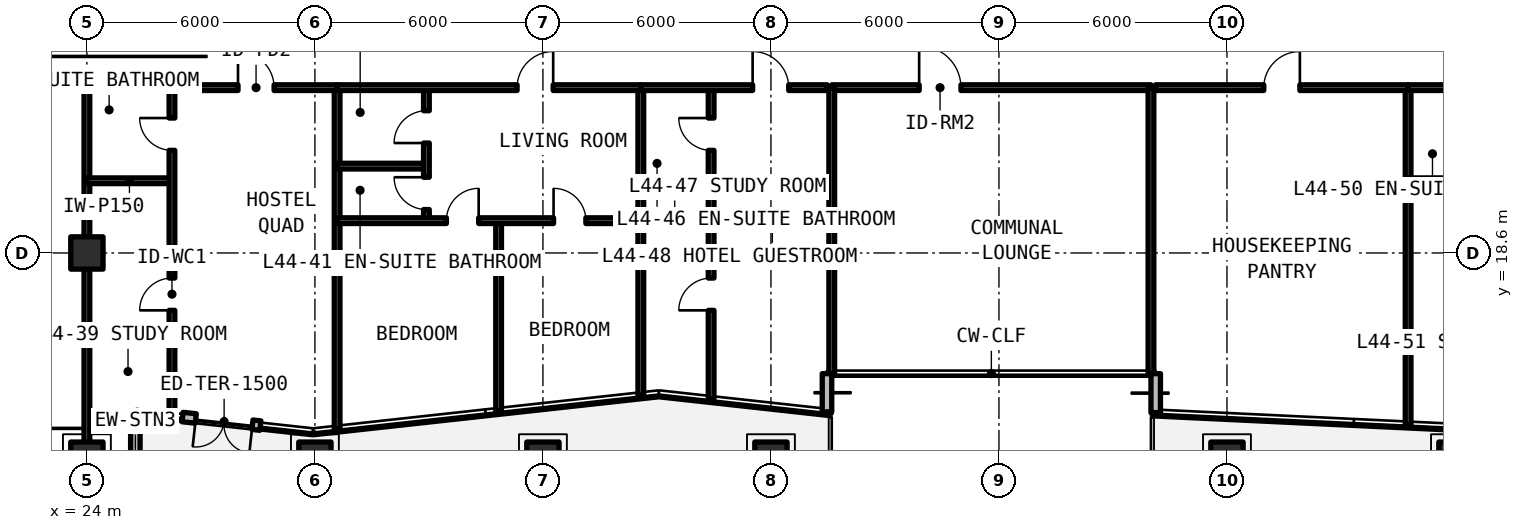
"""IFC4 building model, lengths in metres.
Left out: names, types, materials, properties, quantities, classifications, styles, units other than length and angle.
Written with IfcOpenShell. Run it as: python <this file> out.ifc"""

import sys

from ifc_helpers import new_model, si_unit, direction, frame, frame_2d, origin, origin_2d, place, context, subcontext, project, spatial, rectangle, extrude, element, fill, save


model = new_model("IFC4")
c1 = context("Model", 3, precision=1e-05, world=origin(), true_north=direction((0.0, 1.0)))
c2 = subcontext(c1, "Body", "Model", "MODEL_VIEW")
j1 = project(units=[si_unit("LENGTHUNIT", "METRE"), si_unit("PLANEANGLEUNIT", "RADIAN")], contexts=[c1])
p1 = place(None, origin())
s1 = spatial("IfcSite", under=j1, at=p1, CompositionType="ELEMENT")
p2 = place(p1, origin())
s2 = spatial("IfcBuilding", under=s1, at=p2, CompositionType="ELEMENT")
p3 = place(p2, frame((0.0, 0.0, 158.4)))
s3 = spatial("IfcBuildingStorey", under=s2, at=p3, CompositionType="ELEMENT", Elevation=158.4)
for number, where, z_axis, x_axis in (
    (1, (24.0, 18.6, 0.0), (0.0, 0.0, 1.0), (1.0, 0.0, 0.0)),
    (2, (24.0, 13.2, 0.0), (0.0, 0.0, 1.0), (1.0, 0.0, 0.0)),
    (3, (30.0, 13.2, 0.0), (0.0, 0.0, 1.0), (1.0, 0.0, 0.0)),
    (4, (36.0, 13.2, 0.0), (0.0, 0.0, 1.0), (1.0, 0.0, 0.0)),
    (5, (42.0, 13.2, 0.0), (0.0, 0.0, 1.0), (1.0, 0.0, 0.0)),
    (6, (54.0, 13.2, 0.0), (0.0, 0.0, 1.0), (1.0, 0.0, 0.0)),
    (7, (60.0, 13.2, 0.0), (0.0, 0.0, 1.0), (1.0, 0.0, 0.0)),
):
    element("IfcColumn", number, at=place(p3, frame(where, z_axis=z_axis, x_axis=x_axis)), inside=s3, PredefinedType="COLUMN", context=c2, shape_type="SweptSolid", body=[
        extrude(rectangle(XDim=0.85, YDim=0.85, at=origin_2d()), origin(), (0.0, 0.0, 1.0), 3.63),
    ])
p4 = place(p3, frame((25.275, 12.025, 0.0), z_axis=(0.0, 0.0, 1.0), x_axis=(0.0, 1.0, 0.0)))
e8 = element("IfcWall", 8, at=p4, inside=s3, PredefinedType="SOLIDWALL", context=c2, shape_type="SweptSolid", body=[
    extrude(rectangle(XDim=2.395, YDim=0.25, at=frame_2d((1.197, 0.0))), origin(), (0.0, 0.0, 1.0), 3.41),
])
p5 = place(p3, frame((26.518, 14.283, 0.0), z_axis=(0.0, 0.0, 1.0), x_axis=(0.994024562576, -0.109156625985, 0.0)))
e9 = element("IfcWall", 9, at=p5, inside=s3, PredefinedType="SOLIDWALL", context=c2, shape_type="SweptSolid", body=[
    extrude(rectangle(XDim=2.06, YDim=0.25, at=frame_2d((1.03, 0.0))), origin(), (0.0, 0.0, 1.0), 3.41),
])
p6 = place(p5, frame((0.35, 0.0, 0.0)))
e10 = element("IfcOpeningElement", 10, at=p6, cuts=e9, PredefinedType="OPENING", context=c2, shape_type="SweptSolid", body=[
    extrude(rectangle(XDim=1.5, YDim=2.2, at=frame_2d((0.75, 1.1))), frame((0.0, 0.135, 0.0), z_axis=(0.0, -1.0, 0.0), x_axis=(1.0, 0.0, 0.0)), (0.0, 0.0, 1.0), 0.27),
])
p7 = place(p3, frame((43.475, 14.419, 0.0), z_axis=(0.0, 0.0, 1.0), x_axis=(0.0, 1.0, 0.0)))
e11 = element("IfcWall", 11, at=p7, inside=s3, PredefinedType="SOLIDWALL", context=c2, shape_type="SweptSolid", body=[
    extrude(rectangle(XDim=1.006, YDim=0.25, at=frame_2d((0.503, 0.0))), origin(), (0.0, 0.0, 1.0), 3.41),
])
p8 = place(p3, frame((52.125, 15.425, 0.0), z_axis=(0.0, 0.0, 1.0), x_axis=(0.0, -1.0, 0.0)))
e12 = element("IfcWall", 12, at=p8, inside=s3, PredefinedType="SOLIDWALL", context=c2, shape_type="SweptSolid", body=[
    extrude(rectangle(XDim=1.026, YDim=0.25, at=frame_2d((0.513, 0.0))), origin(), (0.0, 0.0, 1.0), 3.41),
])
p9 = place(p3, frame((19.725, 16.152, 0.0), z_axis=(0.0, 0.0, 1.0), x_axis=(0.70708586489, -0.707127696864, 0.0)))
e13 = element("IfcWall", 13, at=p9, inside=s3, PredefinedType="SOLIDWALL", context=c2, shape_type="SweptSolid", body=[
    extrude(rectangle(XDim=5.836, YDim=0.25, at=frame_2d((2.918, 0.0))), origin(), (0.0, 0.0, 1.0), 3.41),
])
p10 = place(p9, frame((0.898, 0.0, 0.78)))
e14 = element("IfcOpeningElement", 14, at=p10, cuts=e13, PredefinedType="OPENING", context=c2, shape_type="SweptSolid", body=[
    extrude(rectangle(XDim=3.4, YDim=1.66, at=frame_2d((1.7, 0.83))), frame((0.0, 0.135, 0.0), z_axis=(0.0, -1.0, 0.0), x_axis=(1.0, 0.0, 0.0)), (0.0, 0.0, 1.0), 0.27),
])
p11 = place(p3, frame((43.6, 22.95, 0.0), z_axis=(0.0, 0.0, 1.0), x_axis=(1.0, 0.0, 0.0)))
e15 = element("IfcWall", 15, at=p11, inside=s3, PredefinedType="SOLIDWALL", context=c2, shape_type="SweptSolid", body=[
    extrude(rectangle(XDim=8.4, YDim=0.15, at=frame_2d((4.2, 0.0))), origin(), (0.0, 0.0, 1.0), 2.63),
])
p12 = place(p11, frame((2.3, 0.0, 0.0)))
e16 = element("IfcOpeningElement", 16, at=p12, cuts=e15, PredefinedType="OPENING", context=c2, shape_type="SweptSolid", body=[
    extrude(rectangle(XDim=1.1, YDim=2.15, at=frame_2d((0.55, 1.075))), frame((0.0, 0.085, 0.0), z_axis=(0.0, -1.0, 0.0), x_axis=(1.0, 0.0, 0.0)), (0.0, 0.0, 1.0), 0.17),
])
for number, where, z_axis, x_axis in (
    (17, (43.6, 15.425, 0.0), (0.0, 0.0, 1.0), (0.0, 1.0, 0.0)),
    (18, (52.0, 15.425, 0.0), (0.0, 0.0, 1.0), (0.0, 1.0, 0.0)),
):
    element("IfcWall", number, at=place(p3, frame(where, z_axis=z_axis, x_axis=x_axis)), inside=s3, PredefinedType="SOLIDWALL", context=c2, shape_type="SweptSolid", body=[
        extrude(rectangle(XDim=7.525, YDim=0.15, at=frame_2d((3.762, 0.0))), origin(), (0.0, 0.0, 1.0), 2.63),
    ])
p13 = place(p3, frame((24.0, 12.025, 0.0), z_axis=(0.0, 0.0, 1.0), x_axis=(0.0, 1.0, 0.0)))
e19 = element("IfcWall", 19, at=p13, inside=s3, PredefinedType="SOLIDWALL", context=c2, shape_type="SweptSolid", body=[
    extrude(rectangle(XDim=10.925, YDim=0.15, at=frame_2d((5.462, 0.0))), origin(), (0.0, 0.0, 1.0), 2.63),
])
p14 = place(p3, frame((30.584, 13.976, 0.0), z_axis=(0.0, 0.0, 1.0), x_axis=(0.0, 1.0, 0.0)))
e20 = element("IfcWall", 20, at=p14, inside=s3, PredefinedType="SOLIDWALL", context=c2, shape_type="SweptSolid", body=[
    extrude(rectangle(XDim=8.974, YDim=0.15, at=frame_2d((4.487, 0.0))), origin(), (0.0, 0.0, 1.0), 2.63),
])
p15 = place(p3, frame((24.0, 20.5, 0.0), z_axis=(0.0, 0.0, 1.0), x_axis=(1.0, 0.0, 0.0)))
e21 = element("IfcWall", 21, at=p15, inside=s3, PredefinedType="PARTITIONING", context=c2, shape_type="SweptSolid", body=[
    extrude(rectangle(XDim=2.239, YDim=0.15, at=frame_2d((1.119, 0.0))), origin(), (0.0, 0.0, 1.0), 2.63),
])
p16 = place(p3, frame((26.239, 14.314, 0.0), z_axis=(0.0, 0.0, 1.0), x_axis=(0.0, 1.0, 0.0)))
e22 = element("IfcWall", 22, at=p16, inside=s3, PredefinedType="PARTITIONING", context=c2, shape_type="SweptSolid", body=[
    extrude(rectangle(XDim=8.636, YDim=0.15, at=frame_2d((4.318, 0.0))), origin(), (0.0, 0.0, 1.0), 2.63),
])
p17 = place(p16, frame((2.776, 0.0, 0.0)))
e23 = element("IfcOpeningElement", 23, at=p17, cuts=e22, PredefinedType="OPENING", context=c2, shape_type="SweptSolid", body=[
    extrude(rectangle(XDim=0.85, YDim=2.1, at=frame_2d((0.425, 1.05))), frame((0.0, 0.085, 0.0), z_axis=(0.0, -1.0, 0.0), x_axis=(1.0, 0.0, 0.0)), (0.0, 0.0, 1.0), 0.17),
])
p18 = place(p16, frame((6.986, 0.0, 0.0)))
e24 = element("IfcOpeningElement", 24, at=p18, cuts=e22, PredefinedType="OPENING", context=c2, shape_type="SweptSolid", body=[
    extrude(rectangle(XDim=0.85, YDim=2.1, at=frame_2d((0.425, 1.05))), frame((0.0, 0.085, 0.0), z_axis=(0.0, -1.0, 0.0), x_axis=(1.0, 0.0, 0.0)), (0.0, 0.0, 1.0), 0.17),
])
p19 = place(p3, frame((24.0, 22.95, 0.0), z_axis=(0.0, 0.0, 1.0), x_axis=(1.0, 0.0, 0.0)))
e25 = element("IfcWall", 25, at=p19, inside=s3, PredefinedType="SOLIDWALL", context=c2, shape_type="SweptSolid", body=[
    extrude(rectangle(XDim=6.584, YDim=0.15, at=frame_2d((3.292, 0.0))), origin(), (0.0, 0.0, 1.0), 2.63),
])
p20 = place(p19, frame((3.976, 0.0, 0.0)))
e26 = element("IfcOpeningElement", 26, at=p20, cuts=e25, PredefinedType="OPENING", context=c2, shape_type="SweptSolid", body=[
    extrude(rectangle(XDim=0.95, YDim=2.15, at=frame_2d((0.475, 1.075))), frame((0.0, 0.085, 0.0), z_axis=(0.0, -1.0, 0.0), x_axis=(1.0, 0.0, 0.0)), (0.0, 0.0, 1.0), 0.17),
])
p21 = place(p3, frame((38.576, 14.854, 0.0), z_axis=(0.0, 0.0, 1.0), x_axis=(0.0, 1.0, 0.0)))
e27 = element("IfcWall", 27, at=p21, inside=s3, PredefinedType="SOLIDWALL", context=c2, shape_type="SweptSolid", body=[
    extrude(rectangle(XDim=8.096, YDim=0.15, at=frame_2d((4.048, 0.0))), origin(), (0.0, 0.0, 1.0), 2.63),
])
p22 = place(p3, frame((30.584, 20.885, 0.0), z_axis=(0.0, 0.0, 1.0), x_axis=(1.0, 0.0, 0.0)))
e28 = element("IfcWall", 28, at=p22, inside=s3, PredefinedType="PARTITIONING", context=c2, shape_type="SweptSolid", body=[
    extrude(rectangle(XDim=2.35, YDim=0.15, at=frame_2d((1.175, 0.0))), origin(), (0.0, 0.0, 1.0), 2.63),
])
p23 = place(p3, frame((32.934, 19.45, 0.0), z_axis=(0.0, 0.0, 1.0), x_axis=(0.0, 1.0, 0.0)))
e29 = element("IfcWall", 29, at=p23, inside=s3, PredefinedType="PARTITIONING", context=c2, shape_type="SweptSolid", body=[
    extrude(rectangle(XDim=3.5, YDim=0.15, at=frame_2d((1.75, 0.0))), origin(), (0.0, 0.0, 1.0), 2.63),
])
p24 = place(p23, frame((0.292, 0.0, 0.0)))
e30 = element("IfcOpeningElement", 30, at=p24, cuts=e29, PredefinedType="OPENING", context=c2, shape_type="SweptSolid", body=[
    extrude(rectangle(XDim=0.85, YDim=2.1, at=frame_2d((0.425, 1.05))), frame((0.0, 0.085, 0.0), z_axis=(0.0, -1.0, 0.0), x_axis=(1.0, 0.0, 0.0)), (0.0, 0.0, 1.0), 0.17),
])
p25 = place(p23, frame((2.042, 0.0, 0.0)))
e31 = element("IfcOpeningElement", 31, at=p25, cuts=e29, PredefinedType="OPENING", context=c2, shape_type="SweptSolid", body=[
    extrude(rectangle(XDim=0.85, YDim=2.1, at=frame_2d((0.425, 1.05))), frame((0.0, 0.085, 0.0), z_axis=(0.0, -1.0, 0.0), x_axis=(1.0, 0.0, 0.0)), (0.0, 0.0, 1.0), 0.17),
])
p26 = place(p3, frame((34.834, 14.442, 0.0), z_axis=(0.0, 0.0, 1.0), x_axis=(0.0, 1.0, 0.0)))
e32 = element("IfcWall", 32, at=p26, inside=s3, PredefinedType="PARTITIONING", context=c2, shape_type="SweptSolid", body=[
    extrude(rectangle(XDim=5.008, YDim=0.15, at=frame_2d((2.504, 0.0))), origin(), (0.0, 0.0, 1.0), 2.63),
])
p27 = place(p3, frame((30.584, 19.45, 0.0), z_axis=(0.0, 0.0, 1.0), x_axis=(1.0, 0.0, 0.0)))
e33 = element("IfcWall", 33, at=p27, inside=s3, PredefinedType="PARTITIONING", context=c2, shape_type="SweptSolid", body=[
    extrude(rectangle(XDim=7.992, YDim=0.15, at=frame_2d((3.996, 0.0))), origin(), (0.0, 0.0, 1.0), 2.63),
])
p28 = place(p27, frame((2.875, 0.0, 0.0)))
e34 = element("IfcOpeningElement", 34, at=p28, cuts=e33, PredefinedType="OPENING", context=c2, shape_type="SweptSolid", body=[
    extrude(rectangle(XDim=0.85, YDim=2.1, at=frame_2d((0.425, 1.05))), frame((0.0, 0.085, 0.0), z_axis=(0.0, -1.0, 0.0), x_axis=(1.0, 0.0, 0.0)), (0.0, 0.0, 1.0), 0.17),
])
p29 = place(p27, frame((5.696, 0.0, 0.0)))
e35 = element("IfcOpeningElement", 35, at=p29, cuts=e33, PredefinedType="OPENING", context=c2, shape_type="SweptSolid", body=[
    extrude(rectangle(XDim=0.85, YDim=2.1, at=frame_2d((0.425, 1.05))), frame((0.0, 0.085, 0.0), z_axis=(0.0, -1.0, 0.0), x_axis=(1.0, 0.0, 0.0)), (0.0, 0.0, 1.0), 0.17),
])
p30 = place(p3, frame((30.584, 22.95, 0.0), z_axis=(0.0, 0.0, 1.0), x_axis=(1.0, 0.0, 0.0)))
e36 = element("IfcWall", 36, at=p30, inside=s3, PredefinedType="SOLIDWALL", context=c2, shape_type="SweptSolid", body=[
    extrude(rectangle(XDim=7.992, YDim=0.15, at=frame_2d((3.996, 0.0))), origin(), (0.0, 0.0, 1.0), 2.63),
])
p31 = place(p30, frame((4.736, 0.0, 0.0)))
e37 = element("IfcOpeningElement", 37, at=p31, cuts=e36, PredefinedType="OPENING", context=c2, shape_type="SweptSolid", body=[
    extrude(rectangle(XDim=0.95, YDim=2.15, at=frame_2d((0.475, 1.075))), frame((0.0, 0.085, 0.0), z_axis=(0.0, -1.0, 0.0), x_axis=(1.0, 0.0, 0.0)), (0.0, 0.0, 1.0), 0.17),
])
p32 = place(p3, frame((38.576, 20.5, 0.0), z_axis=(0.0, 0.0, 1.0), x_axis=(1.0, 0.0, 0.0)))
e38 = element("IfcWall", 38, at=p32, inside=s3, PredefinedType="PARTITIONING", context=c2, shape_type="SweptSolid", body=[
    extrude(rectangle(XDim=1.85, YDim=0.15, at=frame_2d((0.925, 0.0))), origin(), (0.0, 0.0, 1.0), 2.63),
])
p33 = place(p3, frame((40.426, 14.755, 0.0), z_axis=(0.0, 0.0, 1.0), x_axis=(0.0, 1.0, 0.0)))
e39 = element("IfcWall", 39, at=p33, inside=s3, PredefinedType="PARTITIONING", context=c2, shape_type="SweptSolid", body=[
    extrude(rectangle(XDim=8.195, YDim=0.15, at=frame_2d((4.098, 0.0))), origin(), (0.0, 0.0, 1.0), 2.63),
])
p34 = place(p33, frame((2.335, 0.0, 0.0)))
e40 = element("IfcOpeningElement", 40, at=p34, cuts=e39, PredefinedType="OPENING", context=c2, shape_type="SweptSolid", body=[
    extrude(rectangle(XDim=0.85, YDim=2.1, at=frame_2d((0.425, 1.05))), frame((0.0, 0.085, 0.0), z_axis=(0.0, -1.0, 0.0), x_axis=(1.0, 0.0, 0.0)), (0.0, 0.0, 1.0), 0.17),
])
p35 = place(p33, frame((6.545, 0.0, 0.0)))
e41 = element("IfcOpeningElement", 41, at=p35, cuts=e39, PredefinedType="OPENING", context=c2, shape_type="SweptSolid", body=[
    extrude(rectangle(XDim=0.85, YDim=2.1, at=frame_2d((0.425, 1.05))), frame((0.0, 0.085, 0.0), z_axis=(0.0, -1.0, 0.0), x_axis=(1.0, 0.0, 0.0)), (0.0, 0.0, 1.0), 0.17),
])
p36 = place(p3, frame((38.576, 22.95, 0.0), z_axis=(0.0, 0.0, 1.0), x_axis=(1.0, 0.0, 0.0)))
e42 = element("IfcWall", 42, at=p36, inside=s3, PredefinedType="SOLIDWALL", context=c2, shape_type="SweptSolid", body=[
    extrude(rectangle(XDim=4.904, YDim=0.15, at=frame_2d((2.452, 0.0))), origin(), (0.0, 0.0, 1.0), 2.63),
])
p37 = place(p36, frame((2.942, 0.0, 0.0)))
e43 = element("IfcOpeningElement", 43, at=p37, cuts=e42, PredefinedType="OPENING", context=c2, shape_type="SweptSolid", body=[
    extrude(rectangle(XDim=0.95, YDim=2.15, at=frame_2d((0.475, 1.075))), frame((0.0, 0.085, 0.0), z_axis=(0.0, -1.0, 0.0), x_axis=(1.0, 0.0, 0.0)), (0.0, 0.0, 1.0), 0.17),
])
p38 = place(p3, frame((58.767, 14.084, 0.0), z_axis=(0.0, 0.0, 1.0), x_axis=(0.0, 1.0, 0.0)))
e44 = element("IfcWall", 44, at=p38, inside=s3, PredefinedType="SOLIDWALL", context=c2, shape_type="SweptSolid", body=[
    extrude(rectangle(XDim=8.865, YDim=0.15, at=frame_2d((4.433, 0.0))), origin(), (0.0, 0.0, 1.0), 2.63),
])
p39 = place(p3, frame((52.12, 22.95, 0.0), z_axis=(0.0, 0.0, 1.0), x_axis=(1.0, 0.0, 0.0)))
e45 = element("IfcWall", 45, at=p39, inside=s3, PredefinedType="SOLIDWALL", context=c2, shape_type="SweptSolid", body=[
    extrude(rectangle(XDim=6.646, YDim=0.15, at=frame_2d((3.323, 0.0))), origin(), (0.0, 0.0, 1.0), 2.63),
])
p40 = place(p39, frame((2.848, 0.0, 0.0)))
e46 = element("IfcOpeningElement", 46, at=p40, cuts=e45, PredefinedType="OPENING", context=c2, shape_type="SweptSolid", body=[
    extrude(rectangle(XDim=0.95, YDim=2.15, at=frame_2d((0.475, 1.075))), frame((0.0, 0.085, 0.0), z_axis=(0.0, -1.0, 0.0), x_axis=(1.0, 0.0, 0.0)), (0.0, 0.0, 1.0), 0.17),
])
p41 = place(p3, frame((58.767, 20.5, 0.0), z_axis=(0.0, 0.0, 1.0), x_axis=(1.0, 0.0, 0.0)))
e47 = element("IfcWall", 47, at=p41, inside=s3, PredefinedType="PARTITIONING", context=c2, shape_type="SweptSolid", body=[
    extrude(rectangle(XDim=2.35, YDim=0.15, at=frame_2d((1.175, 0.0))), origin(), (0.0, 0.0, 1.0), 2.63),
])
p42 = place(p3, frame((58.767, 22.95, 0.0), z_axis=(0.0, 0.0, 1.0), x_axis=(1.0, 0.0, 0.0)))
e48 = element("IfcWall", 48, at=p42, inside=s3, PredefinedType="SOLIDWALL", context=c2, shape_type="SweptSolid", body=[
    extrude(rectangle(XDim=7.754, YDim=0.15, at=frame_2d((3.877, 0.0))), origin(), (0.0, 0.0, 1.0), 2.63),
])
p43 = place(p42, frame((4.617, 0.0, 0.0)))
e49 = element("IfcOpeningElement", 49, at=p43, cuts=e48, PredefinedType="OPENING", context=c2, shape_type="SweptSolid", body=[
    extrude(rectangle(XDim=0.95, YDim=2.15, at=frame_2d((0.475, 1.075))), frame((0.0, 0.085, 0.0), z_axis=(0.0, -1.0, 0.0), x_axis=(1.0, 0.0, 0.0)), (0.0, 0.0, 1.0), 0.17),
])
p44 = place(p6, frame((1.5, 0.0, 0.0), z_axis=(0.0, 0.0, 1.0), x_axis=(-1.0, 0.0, 0.0)))
e50 = element("IfcDoor", 50, at=p44, inside=s3, OperationType="SINGLE_SWING_RIGHT", PredefinedType="DOOR", context=c2, shape_type="SweptSolid", body=[
    extrude(rectangle(XDim=1.5, YDim=2.2, at=frame_2d((0.75, 1.1))), frame((0.0, 0.025, 0.0), z_axis=(0.0, -1.0, 0.0), x_axis=(1.0, 0.0, 0.0)), (0.0, 0.0, 1.0), 0.05),
])
fill(e10, e50)
p45 = place(p12, origin())
e51 = element("IfcDoor", 51, at=p45, inside=s3, OperationType="SINGLE_SWING_LEFT", PredefinedType="DOOR", context=c2, shape_type="SweptSolid", body=[
    extrude(rectangle(XDim=1.1, YDim=2.15, at=frame_2d((0.55, 1.075))), frame((0.0, 0.025, 0.0), z_axis=(0.0, -1.0, 0.0), x_axis=(1.0, 0.0, 0.0)), (0.0, 0.0, 1.0), 0.05),
])
fill(e16, e51)
p46 = place(p17, origin())
e52 = element("IfcDoor", 52, at=p46, inside=s3, OperationType="SINGLE_SWING_LEFT", PredefinedType="DOOR", context=c2, shape_type="SweptSolid", body=[
    extrude(rectangle(XDim=0.85, YDim=2.1, at=frame_2d((0.425, 1.05))), frame((0.0, 0.025, 0.0), z_axis=(0.0, -1.0, 0.0), x_axis=(1.0, 0.0, 0.0)), (0.0, 0.0, 1.0), 0.05),
])
fill(e23, e52)
p47 = place(p18, origin())
e53 = element("IfcDoor", 53, at=p47, inside=s3, OperationType="SINGLE_SWING_RIGHT", PredefinedType="DOOR", context=c2, shape_type="SweptSolid", body=[
    extrude(rectangle(XDim=0.85, YDim=2.1, at=frame_2d((0.425, 1.05))), frame((0.0, 0.025, 0.0), z_axis=(0.0, -1.0, 0.0), x_axis=(1.0, 0.0, 0.0)), (0.0, 0.0, 1.0), 0.05),
])
fill(e24, e53)
p48 = place(p20, origin())
e54 = element("IfcDoor", 54, at=p48, inside=s3, OperationType="SINGLE_SWING_LEFT", PredefinedType="DOOR", context=c2, shape_type="SweptSolid", body=[
    extrude(rectangle(XDim=0.95, YDim=2.15, at=frame_2d((0.475, 1.075))), frame((0.0, 0.025, 0.0), z_axis=(0.0, -1.0, 0.0), x_axis=(1.0, 0.0, 0.0)), (0.0, 0.0, 1.0), 0.05),
])
fill(e26, e54)
p49 = place(p24, origin())
e55 = element("IfcDoor", 55, at=p49, inside=s3, OperationType="SINGLE_SWING_RIGHT", PredefinedType="DOOR", context=c2, shape_type="SweptSolid", body=[
    extrude(rectangle(XDim=0.85, YDim=2.1, at=frame_2d((0.425, 1.05))), frame((0.0, 0.025, 0.0), z_axis=(0.0, -1.0, 0.0), x_axis=(1.0, 0.0, 0.0)), (0.0, 0.0, 1.0), 0.05),
])
fill(e30, e55)
p50 = place(p25, origin())
e56 = element("IfcDoor", 56, at=p50, inside=s3, OperationType="SINGLE_SWING_LEFT", PredefinedType="DOOR", context=c2, shape_type="SweptSolid", body=[
    extrude(rectangle(XDim=0.85, YDim=2.1, at=frame_2d((0.425, 1.05))), frame((0.0, 0.025, 0.0), z_axis=(0.0, -1.0, 0.0), x_axis=(1.0, 0.0, 0.0)), (0.0, 0.0, 1.0), 0.05),
])
fill(e31, e56)
p51 = place(p28, origin())
e57 = element("IfcDoor", 57, at=p51, inside=s3, OperationType="SINGLE_SWING_RIGHT", PredefinedType="DOOR", context=c2, shape_type="SweptSolid", body=[
    extrude(rectangle(XDim=0.85, YDim=2.1, at=frame_2d((0.425, 1.05))), frame((0.0, 0.025, 0.0), z_axis=(0.0, -1.0, 0.0), x_axis=(1.0, 0.0, 0.0)), (0.0, 0.0, 1.0), 0.05),
])
fill(e34, e57)
p52 = place(p29, origin())
e58 = element("IfcDoor", 58, at=p52, inside=s3, OperationType="SINGLE_SWING_LEFT", PredefinedType="DOOR", context=c2, shape_type="SweptSolid", body=[
    extrude(rectangle(XDim=0.85, YDim=2.1, at=frame_2d((0.425, 1.05))), frame((0.0, 0.025, 0.0), z_axis=(0.0, -1.0, 0.0), x_axis=(1.0, 0.0, 0.0)), (0.0, 0.0, 1.0), 0.05),
])
fill(e35, e58)
p53 = place(p31, origin())
e59 = element("IfcDoor", 59, at=p53, inside=s3, OperationType="SINGLE_SWING_RIGHT", PredefinedType="DOOR", context=c2, shape_type="SweptSolid", body=[
    extrude(rectangle(XDim=0.95, YDim=2.15, at=frame_2d((0.475, 1.075))), frame((0.0, 0.025, 0.0), z_axis=(0.0, -1.0, 0.0), x_axis=(1.0, 0.0, 0.0)), (0.0, 0.0, 1.0), 0.05),
])
fill(e37, e59)
p54 = place(p34, origin())
e60 = element("IfcDoor", 60, at=p54, inside=s3, OperationType="SINGLE_SWING_LEFT", PredefinedType="DOOR", context=c2, shape_type="SweptSolid", body=[
    extrude(rectangle(XDim=0.85, YDim=2.1, at=frame_2d((0.425, 1.05))), frame((0.0, 0.025, 0.0), z_axis=(0.0, -1.0, 0.0), x_axis=(1.0, 0.0, 0.0)), (0.0, 0.0, 1.0), 0.05),
])
fill(e40, e60)
p55 = place(p35, origin())
e61 = element("IfcDoor", 61, at=p55, inside=s3, OperationType="SINGLE_SWING_RIGHT", PredefinedType="DOOR", context=c2, shape_type="SweptSolid", body=[
    extrude(rectangle(XDim=0.85, YDim=2.1, at=frame_2d((0.425, 1.05))), frame((0.0, 0.025, 0.0), z_axis=(0.0, -1.0, 0.0), x_axis=(1.0, 0.0, 0.0)), (0.0, 0.0, 1.0), 0.05),
])
fill(e41, e61)
p56 = place(p37, origin())
e62 = element("IfcDoor", 62, at=p56, inside=s3, OperationType="SINGLE_SWING_LEFT", PredefinedType="DOOR", context=c2, shape_type="SweptSolid", body=[
    extrude(rectangle(XDim=0.95, YDim=2.15, at=frame_2d((0.475, 1.075))), frame((0.0, 0.025, 0.0), z_axis=(0.0, -1.0, 0.0), x_axis=(1.0, 0.0, 0.0)), (0.0, 0.0, 1.0), 0.05),
])
fill(e43, e62)
p57 = place(p40, origin())
e63 = element("IfcDoor", 63, at=p57, inside=s3, OperationType="SINGLE_SWING_RIGHT", PredefinedType="DOOR", context=c2, shape_type="SweptSolid", body=[
    extrude(rectangle(XDim=0.95, YDim=2.15, at=frame_2d((0.475, 1.075))), frame((0.0, 0.025, 0.0), z_axis=(0.0, -1.0, 0.0), x_axis=(1.0, 0.0, 0.0)), (0.0, 0.0, 1.0), 0.05),
])
fill(e46, e63)
save(model, sys.argv[1])
